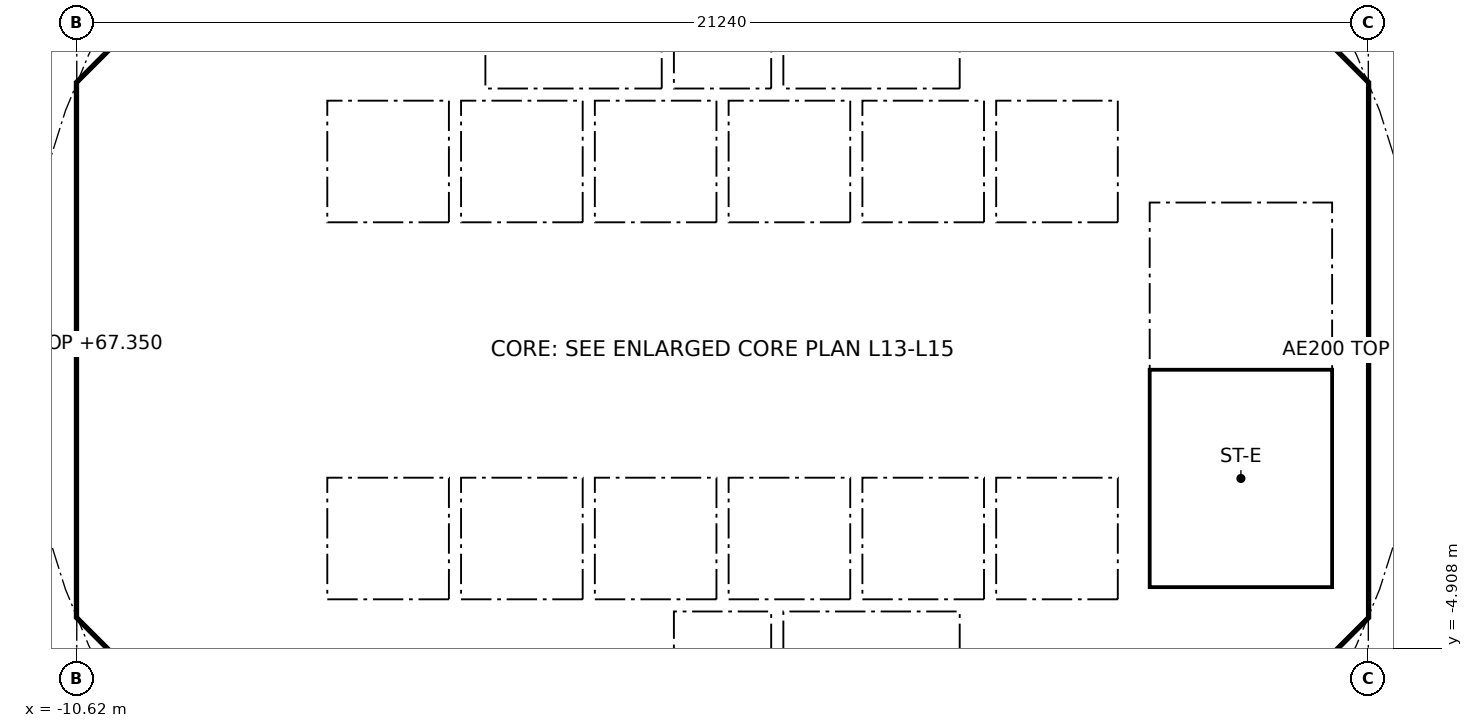
"""IFC4 building model, lengths in metres.
Left out: names, types, materials, properties, quantities, classifications, styles, units other than length and angle.
Written with IfcOpenShell. Run it as: python <this file> out.ifc"""

import sys

from ifc_helpers import new_model, si_unit, direction, frame, frame_2d, origin, place, context, subcontext, project, spatial, polyline, rectangle, outline, extrude, element, fill, save


model = new_model("IFC4")
c1 = context("Model", 3, precision=1e-05, world=origin(), true_north=direction((0.0, 1.0)))
c2 = subcontext(c1, "Body", "Model", "MODEL_VIEW")
j1 = project(units=[si_unit("LENGTHUNIT", "METRE"), si_unit("PLANEANGLEUNIT", "RADIAN")], contexts=[c1])
p1 = place(None, origin())
s1 = spatial("IfcSite", under=j1, at=p1, CompositionType="ELEMENT")
p2 = place(p1, origin())
s2 = spatial("IfcBuilding", under=s1, at=p2, CompositionType="ELEMENT")
p3 = place(p2, frame((0.0, 0.0, 64.0)))
s3 = spatial("IfcBuildingStorey", under=s2, at=p3, CompositionType="ELEMENT", Elevation=64.0)
p4 = place(p3, frame((9.988, 4.613, 0.0), z_axis=(0.0, 0.0, 1.0), x_axis=(-0.707106781187, 0.707106781187, 0.0)))
e1 = element("IfcWall", 1, at=p4, inside=s3, PredefinedType="SHEAR", context=c2, shape_type="SweptSolid", body=[
    extrude(rectangle(XDim=7.602, YDim=0.6, at=frame_2d((3.801, 0.0))), origin(), (0.0, 0.0, 1.0), 3.35),
])
p5 = place(p4, frame((3.201, 0.0, 0.0)))
e2 = element("IfcOpeningElement", 2, at=p5, cuts=e1, PredefinedType="OPENING", context=c2, shape_type="SweptSolid", body=[
    extrude(rectangle(XDim=1.2, YDim=2.1, at=frame_2d((0.6, 1.05))), frame((0.0, 0.31, 0.0), z_axis=(0.0, -1.0, 0.0), x_axis=(1.0, 0.0, 0.0)), (0.0, 0.0, 1.0), 0.62),
])
p6 = place(p3, frame((-4.613, 9.988, 0.0), z_axis=(0.0, 0.0, 1.0), x_axis=(-0.707106781187, -0.707106781187, 0.0)))
e3 = element("IfcWall", 3, at=p6, inside=s3, PredefinedType="SHEAR", context=c2, shape_type="SweptSolid", body=[
    extrude(rectangle(XDim=7.602, YDim=0.6, at=frame_2d((3.801, 0.0))), origin(), (0.0, 0.0, 1.0), 3.35),
])
p7 = place(p6, frame((0.351, 0.0, 0.0)))
e4 = element("IfcOpeningElement", 4, at=p7, cuts=e3, PredefinedType="OPENING", context=c2, shape_type="SweptSolid", body=[
    extrude(rectangle(XDim=1.1, YDim=2.1, at=frame_2d((0.55, 1.05))), frame((0.0, 0.31, 0.0), z_axis=(0.0, -1.0, 0.0), x_axis=(1.0, 0.0, 0.0)), (0.0, 0.0, 1.0), 0.62),
])
p8 = place(p3, frame((-10.325, 3.801, 0.0), z_axis=(0.0, 0.0, 1.0), x_axis=(0.0, -1.0, 0.0)))
e5 = element("IfcWall", 5, at=p8, inside=s3, PredefinedType="SHEAR", context=c2, shape_type="SweptSolid", body=[
    extrude(rectangle(XDim=7.602, YDim=0.6, at=frame_2d((3.801, 0.0))), origin(), (0.0, 0.0, 1.0), 3.35),
])
p9 = place(p8, frame((0.651, 0.0, 0.0)))
e6 = element("IfcOpeningElement", 6, at=p9, cuts=e5, PredefinedType="OPENING", context=c2, shape_type="SweptSolid", body=[
    extrude(rectangle(XDim=1.5, YDim=2.1, at=frame_2d((0.75, 1.05))), frame((0.0, 0.31, 0.0), z_axis=(0.0, -1.0, 0.0), x_axis=(1.0, 0.0, 0.0)), (0.0, 0.0, 1.0), 0.62),
])
p10 = place(p8, frame((5.451, 0.0, 0.0)))
e7 = element("IfcOpeningElement", 7, at=p10, cuts=e5, PredefinedType="OPENING", context=c2, shape_type="SweptSolid", body=[
    extrude(rectangle(XDim=1.5, YDim=2.1, at=frame_2d((0.75, 1.05))), frame((0.0, 0.31, 0.0), z_axis=(0.0, -1.0, 0.0), x_axis=(1.0, 0.0, 0.0)), (0.0, 0.0, 1.0), 0.62),
])
p11 = place(p3, frame((-9.988, -4.613, 0.0), z_axis=(0.0, 0.0, 1.0), x_axis=(0.707106781187, -0.707106781187, 0.0)))
e8 = element("IfcWall", 8, at=p11, inside=s3, PredefinedType="SHEAR", context=c2, shape_type="SweptSolid", body=[
    extrude(rectangle(XDim=7.602, YDim=0.6, at=frame_2d((3.801, 0.0))), origin(), (0.0, 0.0, 1.0), 3.35),
])
p12 = place(p11, frame((6.151, 0.0, 0.0)))
e9 = element("IfcOpeningElement", 9, at=p12, cuts=e8, PredefinedType="OPENING", context=c2, shape_type="SweptSolid", body=[
    extrude(rectangle(XDim=1.1, YDim=2.1, at=frame_2d((0.55, 1.05))), frame((0.0, 0.31, 0.0), z_axis=(0.0, -1.0, 0.0), x_axis=(1.0, 0.0, 0.0)), (0.0, 0.0, 1.0), 0.62),
])
p13 = place(p3, frame((4.613, -9.988, 0.0), z_axis=(0.0, 0.0, 1.0), x_axis=(0.707106781187, 0.707106781187, 0.0)))
e10 = element("IfcWall", 10, at=p13, inside=s3, PredefinedType="SHEAR", context=c2, shape_type="SweptSolid", body=[
    extrude(rectangle(XDim=7.602, YDim=0.6, at=frame_2d((3.801, 0.0))), origin(), (0.0, 0.0, 1.0), 3.35),
])
p14 = place(p13, frame((3.201, 0.0, 0.0)))
e11 = element("IfcOpeningElement", 11, at=p14, cuts=e10, PredefinedType="OPENING", context=c2, shape_type="SweptSolid", body=[
    extrude(rectangle(XDim=1.2, YDim=2.1, at=frame_2d((0.6, 1.05))), frame((0.0, 0.31, 0.0), z_axis=(0.0, -1.0, 0.0), x_axis=(1.0, 0.0, 0.0)), (0.0, 0.0, 1.0), 0.62),
])
p15 = place(p3, frame((-5.8, 4.3, 0.0), z_axis=(0.0, 0.0, 1.0), x_axis=(0.0, 1.0, 0.0)))
e12 = element("IfcWall", 12, at=p15, inside=s3, PredefinedType="PARTITIONING", context=c2, shape_type="SweptSolid", body=[
    extrude(rectangle(XDim=3.927, YDim=0.15, at=frame_2d((1.963, 0.0))), origin(), (0.0, 0.0, 1.0), 3.35),
])
p16 = place(p15, frame((0.413, 0.0, 0.0)))
e13 = element("IfcOpeningElement", 13, at=p16, cuts=e12, PredefinedType="OPENING", context=c2, shape_type="SweptSolid", body=[
    extrude(rectangle(XDim=0.9, YDim=2.1, at=frame_2d((0.45, 1.05))), frame((0.0, 0.085, 0.0), z_axis=(0.0, -1.0, 0.0), x_axis=(1.0, 0.0, 0.0)), (0.0, 0.0, 1.0), 0.17),
])
p17 = place(p15, frame((2.489, 0.0, 0.0)))
e14 = element("IfcOpeningElement", 14, at=p17, cuts=e12, PredefinedType="OPENING", context=c2, shape_type="SweptSolid", body=[
    extrude(rectangle(XDim=0.9, YDim=2.1, at=frame_2d((0.45, 1.05))), frame((0.0, 0.085, 0.0), z_axis=(0.0, -1.0, 0.0), x_axis=(1.0, 0.0, 0.0)), (0.0, 0.0, 1.0), 0.17),
])
p18 = place(p3, frame((4.0, 4.3, 0.0), z_axis=(0.0, 0.0, 1.0), x_axis=(0.0, 1.0, 0.0)))
e15 = element("IfcWall", 15, at=p18, inside=s3, PredefinedType="SOLIDWALL", context=c2, shape_type="SweptSolid", body=[
    extrude(rectangle(XDim=2.2, YDim=0.2, at=frame_2d((1.1, 0.0))), origin(), (0.0, 0.0, 1.0), 3.35),
])
p19 = place(p18, frame((0.55, 0.0, 0.0)))
e16 = element("IfcOpeningElement", 16, at=p19, cuts=e15, PredefinedType="OPENING", context=c2, shape_type="SweptSolid", body=[
    extrude(rectangle(XDim=1.1, YDim=2.1, at=frame_2d((0.55, 1.05))), frame((0.0, 0.11, 0.0), z_axis=(0.0, -1.0, 0.0), x_axis=(1.0, 0.0, 0.0)), (0.0, 0.0, 1.0), 0.22),
])
p20 = place(p3, frame((-4.0, 4.3, 0.0), z_axis=(0.0, 0.0, 1.0), x_axis=(0.0, 1.0, 0.0)))
e17 = element("IfcWall", 17, at=p20, inside=s3, PredefinedType="SOLIDWALL", context=c2, shape_type="SweptSolid", body=[
    extrude(rectangle(XDim=2.2, YDim=0.2, at=frame_2d((1.1, 0.0))), origin(), (0.0, 0.0, 1.0), 3.35),
])
p21 = place(p20, frame((0.55, 0.0, 0.0)))
e18 = element("IfcOpeningElement", 18, at=p21, cuts=e17, PredefinedType="OPENING", context=c2, shape_type="SweptSolid", body=[
    extrude(rectangle(XDim=1.1, YDim=2.1, at=frame_2d((0.55, 1.05))), frame((0.0, 0.11, 0.0), z_axis=(0.0, -1.0, 0.0), x_axis=(1.0, 0.0, 0.0)), (0.0, 0.0, 1.0), 0.22),
])
p22 = place(p3, frame((-6.7, 2.0, 0.0), z_axis=(0.0, 0.0, 1.0), x_axis=(1.0, 0.0, 0.0)))
e19 = element("IfcWall", 19, at=p22, inside=s3, PredefinedType="SOLIDWALL", context=c2, shape_type="SweptSolid", body=[
    extrude(rectangle(XDim=13.4, YDim=0.2, at=frame_2d((6.7, 0.0))), origin(), (0.0, 0.0, 1.0), 3.35),
])
p23 = place(p22, frame((0.65, 0.0, 0.0)))
e20 = element("IfcOpeningElement", 20, at=p23, cuts=e19, PredefinedType="OPENING", context=c2, shape_type="SweptSolid", body=[
    extrude(rectangle(XDim=1.1, YDim=2.1, at=frame_2d((0.55, 1.05))), frame((0.0, 0.11, 0.0), z_axis=(0.0, -1.0, 0.0), x_axis=(1.0, 0.0, 0.0)), (0.0, 0.0, 1.0), 0.22),
])
p24 = place(p22, frame((2.85, 0.0, 0.0)))
e21 = element("IfcOpeningElement", 21, at=p24, cuts=e19, PredefinedType="OPENING", context=c2, shape_type="SweptSolid", body=[
    extrude(rectangle(XDim=1.1, YDim=2.1, at=frame_2d((0.55, 1.05))), frame((0.0, 0.11, 0.0), z_axis=(0.0, -1.0, 0.0), x_axis=(1.0, 0.0, 0.0)), (0.0, 0.0, 1.0), 0.22),
])
p25 = place(p22, frame((5.05, 0.0, 0.0)))
e22 = element("IfcOpeningElement", 22, at=p25, cuts=e19, PredefinedType="OPENING", context=c2, shape_type="SweptSolid", body=[
    extrude(rectangle(XDim=1.1, YDim=2.1, at=frame_2d((0.55, 1.05))), frame((0.0, 0.11, 0.0), z_axis=(0.0, -1.0, 0.0), x_axis=(1.0, 0.0, 0.0)), (0.0, 0.0, 1.0), 0.22),
])
p26 = place(p3, frame((6.7, 4.0, 0.0), z_axis=(0.0, 0.0, 1.0), x_axis=(1.0, 0.0, 0.0)))
e23 = element("IfcWall", 23, at=p26, inside=s3, PredefinedType="SOLIDWALL", context=c2, shape_type="SweptSolid", body=[
    extrude(rectangle(XDim=3.325, YDim=0.2, at=frame_2d((1.662, 0.0))), origin(), (0.0, 0.0, 1.0), 3.35),
])
p27 = place(p26, frame((1.25, 0.0, 0.0)))
e24 = element("IfcOpeningElement", 24, at=p27, cuts=e23, PredefinedType="OPENING", context=c2, shape_type="SweptSolid", body=[
    extrude(rectangle(XDim=1.1, YDim=2.1, at=frame_2d((0.55, 1.05))), frame((0.0, 0.11, 0.0), z_axis=(0.0, -1.0, 0.0), x_axis=(1.0, 0.0, 0.0)), (0.0, 0.0, 1.0), 0.22),
])
p28 = place(p3, frame((-7.4, -6.627, 0.0), z_axis=(0.0, 0.0, 1.0), x_axis=(0.0, 1.0, 0.0)))
e25 = element("IfcWall", 25, at=p28, inside=s3, PredefinedType="PARTITIONING", context=c2, shape_type="SweptSolid", body=[
    extrude(rectangle(XDim=2.527, YDim=0.15, at=frame_2d((1.263, 0.0))), origin(), (0.0, 0.0, 1.0), 3.35),
])
p29 = place(p28, frame((0.776, 0.0, 0.0)))
e26 = element("IfcOpeningElement", 26, at=p29, cuts=e25, PredefinedType="OPENING", context=c2, shape_type="SweptSolid", body=[
    extrude(rectangle(XDim=0.9, YDim=2.1, at=frame_2d((0.45, 1.05))), frame((0.0, 0.085, 0.0), z_axis=(0.0, -1.0, 0.0), x_axis=(1.0, 0.0, 0.0)), (0.0, 0.0, 1.0), 0.17),
])
p30 = place(p3, frame((4.0, -6.5, 0.0), z_axis=(0.0, 0.0, 1.0), x_axis=(0.0, 1.0, 0.0)))
e27 = element("IfcWall", 27, at=p30, inside=s3, PredefinedType="SOLIDWALL", context=c2, shape_type="SweptSolid", body=[
    extrude(rectangle(XDim=2.2, YDim=0.2, at=frame_2d((1.1, 0.0))), origin(), (0.0, 0.0, 1.0), 3.35),
])
p31 = place(p30, frame((0.55, 0.0, 0.0)))
e28 = element("IfcOpeningElement", 28, at=p31, cuts=e27, PredefinedType="OPENING", context=c2, shape_type="SweptSolid", body=[
    extrude(rectangle(XDim=1.1, YDim=2.1, at=frame_2d((0.55, 1.05))), frame((0.0, 0.11, 0.0), z_axis=(0.0, -1.0, 0.0), x_axis=(1.0, 0.0, 0.0)), (0.0, 0.0, 1.0), 0.22),
])
p32 = place(p3, frame((-4.0, -6.5, 0.0), z_axis=(0.0, 0.0, 1.0), x_axis=(0.0, 1.0, 0.0)))
e29 = element("IfcWall", 29, at=p32, inside=s3, PredefinedType="SOLIDWALL", context=c2, shape_type="SweptSolid", body=[
    extrude(rectangle(XDim=2.2, YDim=0.2, at=frame_2d((1.1, 0.0))), origin(), (0.0, 0.0, 1.0), 3.35),
])
p33 = place(p32, frame((0.65, 0.0, 0.0)))
e30 = element("IfcOpeningElement", 30, at=p33, cuts=e29, PredefinedType="OPENING", context=c2, shape_type="SweptSolid", body=[
    extrude(rectangle(XDim=0.9, YDim=2.1, at=frame_2d((0.45, 1.05))), frame((0.0, 0.11, 0.0), z_axis=(0.0, -1.0, 0.0), x_axis=(1.0, 0.0, 0.0)), (0.0, 0.0, 1.0), 0.22),
])
p34 = place(p3, frame((-6.7, -2.0, 0.0), z_axis=(0.0, 0.0, 1.0), x_axis=(1.0, 0.0, 0.0)))
e31 = element("IfcWall", 31, at=p34, inside=s3, PredefinedType="SOLIDWALL", context=c2, shape_type="SweptSolid", body=[
    extrude(rectangle(XDim=13.4, YDim=0.2, at=frame_2d((6.7, 0.0))), origin(), (0.0, 0.0, 1.0), 3.35),
])
p35 = place(p34, frame((0.65, 0.0, 0.0)))
e32 = element("IfcOpeningElement", 32, at=p35, cuts=e31, PredefinedType="OPENING", context=c2, shape_type="SweptSolid", body=[
    extrude(rectangle(XDim=1.1, YDim=2.1, at=frame_2d((0.55, 1.05))), frame((0.0, 0.11, 0.0), z_axis=(0.0, -1.0, 0.0), x_axis=(1.0, 0.0, 0.0)), (0.0, 0.0, 1.0), 0.22),
])
p36 = place(p34, frame((2.85, 0.0, 0.0)))
e33 = element("IfcOpeningElement", 33, at=p36, cuts=e31, PredefinedType="OPENING", context=c2, shape_type="SweptSolid", body=[
    extrude(rectangle(XDim=1.1, YDim=2.1, at=frame_2d((0.55, 1.05))), frame((0.0, 0.11, 0.0), z_axis=(0.0, -1.0, 0.0), x_axis=(1.0, 0.0, 0.0)), (0.0, 0.0, 1.0), 0.22),
])
p37 = place(p3, origin())
e34 = element("IfcWall", 34, at=p37, inside=s3, PredefinedType="SHEAR", context=c2, shape_type="SweptSolid", body=[
    extrude(outline(polyline([(-10.625, -3.801), (-10.025, -3.801), (-10.025, -4.152), (-9.776, -4.401), (-10.2, -4.825), (-10.625, -4.401), (-10.625, -3.801)])), origin(), (0.0, 0.0, 1.0), 3.35),
])
p38 = place(p3, origin())
e35 = element("IfcWall", 35, at=p38, inside=s3, PredefinedType="SHEAR", context=c2, shape_type="SweptSolid", body=[
    extrude(outline(polyline([(-10.2, 4.825), (-9.776, 4.401), (-10.025, 4.152), (-10.025, 3.801), (-10.625, 3.801), (-10.625, 4.401), (-10.2, 4.825)])), origin(), (0.0, 0.0, 1.0), 3.35),
])
p39 = place(p3, origin())
e36 = element("IfcWall", 36, at=p39, inside=s3, PredefinedType="SHEAR", context=c2, shape_type="SweptSolid", body=[
    extrude(outline(polyline([(9.776, -4.401), (10.025, -4.152), (10.025, -3.801), (10.025, 4.152), (9.776, 4.401), (10.2, 4.825), (10.625, 4.401), (10.625, -4.401), (10.2, -4.825), (9.776, -4.401)])), origin(), (0.0, 0.0, 1.0), 3.35),
])
for number, where, z_axis, x_axis in (
    (37, (-10.025, -4.0, 0.0), (0.0, 0.0, 1.0), (1.0, 0.0, 0.0)),
    (38, (-10.025, 4.0, 0.0), (0.0, 0.0, 1.0), (1.0, 0.0, 0.0)),
):
    element("IfcWall", number, at=place(p3, frame(where, z_axis=z_axis, x_axis=x_axis)), inside=s3, PredefinedType="PARTITIONING", context=c2, shape_type="SweptSolid", body=[
        extrude(rectangle(XDim=3.325, YDim=0.2, at=frame_2d((1.662, 0.0))), origin(), (0.0, 0.0, 1.0), 3.35),
    ])
for number, where, z_axis, x_axis in (
    (39, (-0.9, -6.5, 0.0), (0.0, 0.0, 1.0), (0.0, 1.0, 0.0)),
    (40, (0.9, -6.5, 0.0), (0.0, 0.0, 1.0), (0.0, 1.0, 0.0)),
):
    element("IfcWall", number, at=place(p3, frame(where, z_axis=z_axis, x_axis=x_axis)), inside=s3, PredefinedType="SOLIDWALL", context=c2, shape_type="SweptSolid", body=[
        extrude(rectangle(XDim=2.2, YDim=0.2, at=frame_2d((1.1, 0.0))), origin(), (0.0, 0.0, 1.0), 3.35),
    ])
p40 = place(p3, origin())
e41 = element("IfcWall", 41, at=p40, inside=s3, PredefinedType="SOLIDWALL", context=c2, shape_type="SweptSolid", body=[
    extrude(outline(polyline([(-6.7, -2.1), (-6.5, -2.1), (-6.5, -4.1), (-4.5, -4.1), (-4.5, -2.1), (-4.3, -2.1), (-4.3, -4.1), (-2.3, -4.1), (-2.3, -2.1), (-2.1, -2.1), (-2.1, -4.1), (-0.1, -4.1), (-0.1, -2.1), (0.1, -2.1), (0.1, -4.1), (2.1, -4.1), (2.1, -2.1), (2.3, -2.1), (2.3, -4.1), (4.3, -4.1), (4.3, -2.1), (4.5, -2.1), (4.5, -4.1), (6.5, -4.1), (6.5, -2.1), (6.7, -2.1), (6.7, -4.3), (-6.7, -4.3), (-6.7, -2.1)])), origin(), (0.0, 0.0, 1.0), 3.35),
])
for number, where, z_axis, x_axis in (
    (42, (-0.9, 4.3, 0.0), (0.0, 0.0, 1.0), (0.0, 1.0, 0.0)),
    (43, (0.9, 4.3, 0.0), (0.0, 0.0, 1.0), (0.0, 1.0, 0.0)),
):
    element("IfcWall", number, at=place(p3, frame(where, z_axis=z_axis, x_axis=x_axis)), inside=s3, PredefinedType="SOLIDWALL", context=c2, shape_type="SweptSolid", body=[
        extrude(rectangle(XDim=2.2, YDim=0.2, at=frame_2d((1.1, 0.0))), origin(), (0.0, 0.0, 1.0), 3.35),
    ])
p41 = place(p3, origin())
e44 = element("IfcWall", 44, at=p41, inside=s3, PredefinedType="SOLIDWALL", context=c2, shape_type="SweptSolid", body=[
    extrude(outline(polyline([(-6.5, 2.1), (-6.7, 2.1), (-6.7, 4.3), (6.7, 4.3), (6.7, 2.1), (6.5, 2.1), (6.5, 4.1), (4.5, 4.1), (4.5, 2.1), (4.3, 2.1), (4.3, 4.1), (2.3, 4.1), (2.3, 2.1), (2.1, 2.1), (2.1, 4.1), (0.1, 4.1), (0.1, 2.1), (-0.1, 2.1), (-0.1, 4.1), (-2.1, 4.1), (-2.1, 2.1), (-2.3, 2.1), (-2.3, 4.1), (-4.3, 4.1), (-4.3, 2.1), (-4.5, 2.1), (-4.5, 4.1), (-6.5, 4.1), (-6.5, 2.1)])), origin(), (0.0, 0.0, 1.0), 3.35),
])
p42 = place(p3, origin())
e45 = element("IfcWall", 45, at=p42, inside=s3, PredefinedType="SOLIDWALL", context=c2, shape_type="SweptSolid", body=[
    extrude(outline(polyline([(7.025, -3.9), (6.7, -3.9), (6.7, 3.9), (7.025, 3.9), (7.025, -3.9)])), origin(), (0.0, 0.0, 1.0), 3.35),
])
p43 = place(p3, origin())
e46 = element("IfcWall", 46, at=p43, inside=s3, PredefinedType="SOLIDWALL", context=c2, shape_type="SweptSolid", body=[
    extrude(outline(polyline([(10.025, -4.1), (6.7, -4.1), (6.7, -3.9), (10.025, -3.9), (10.025, -4.1)])), origin(), (0.0, 0.0, 1.0), 3.35),
])
p44 = place(p23, origin())
e47 = element("IfcDoor", 47, at=p44, inside=s3, OperationType="DOUBLE_DOOR_SLIDING", PredefinedType="DOOR", context=c2, shape_type="SweptSolid", body=[
    extrude(rectangle(XDim=1.1, YDim=2.1, at=frame_2d((0.55, 1.05))), frame((0.0, 0.025, 0.0), z_axis=(0.0, -1.0, 0.0), x_axis=(1.0, 0.0, 0.0)), (0.0, 0.0, 1.0), 0.05),
])
fill(e20, e47)
p45 = place(p24, origin())
e48 = element("IfcDoor", 48, at=p45, inside=s3, OperationType="DOUBLE_DOOR_SLIDING", PredefinedType="DOOR", context=c2, shape_type="SweptSolid", body=[
    extrude(rectangle(XDim=1.1, YDim=2.1, at=frame_2d((0.55, 1.05))), frame((0.0, 0.025, 0.0), z_axis=(0.0, -1.0, 0.0), x_axis=(1.0, 0.0, 0.0)), (0.0, 0.0, 1.0), 0.05),
])
fill(e21, e48)
p46 = place(p25, origin())
e49 = element("IfcDoor", 49, at=p46, inside=s3, OperationType="DOUBLE_DOOR_SLIDING", PredefinedType="DOOR", context=c2, shape_type="SweptSolid", body=[
    extrude(rectangle(XDim=1.1, YDim=2.1, at=frame_2d((0.55, 1.05))), frame((0.0, 0.025, 0.0), z_axis=(0.0, -1.0, 0.0), x_axis=(1.0, 0.0, 0.0)), (0.0, 0.0, 1.0), 0.05),
])
fill(e22, e49)
p47 = place(p35, origin())
e50 = element("IfcDoor", 50, at=p47, inside=s3, OperationType="DOUBLE_DOOR_SLIDING", PredefinedType="DOOR", context=c2, shape_type="SweptSolid", body=[
    extrude(rectangle(XDim=1.1, YDim=2.1, at=frame_2d((0.55, 1.05))), frame((0.0, 0.025, 0.0), z_axis=(0.0, -1.0, 0.0), x_axis=(1.0, 0.0, 0.0)), (0.0, 0.0, 1.0), 0.05),
])
fill(e32, e50)
p48 = place(p36, origin())
e51 = element("IfcDoor", 51, at=p48, inside=s3, OperationType="DOUBLE_DOOR_SLIDING", PredefinedType="DOOR", context=c2, shape_type="SweptSolid", body=[
    extrude(rectangle(XDim=1.1, YDim=2.1, at=frame_2d((0.55, 1.05))), frame((0.0, 0.025, 0.0), z_axis=(0.0, -1.0, 0.0), x_axis=(1.0, 0.0, 0.0)), (0.0, 0.0, 1.0), 0.05),
])
fill(e33, e51)
p49 = place(p19, origin())
e52 = element("IfcDoor", 52, at=p49, inside=s3, OperationType="DOUBLE_DOOR_SLIDING", PredefinedType="DOOR", context=c2, shape_type="SweptSolid", body=[
    extrude(rectangle(XDim=1.1, YDim=2.1, at=frame_2d((0.55, 1.05))), frame((0.0, 0.025, 0.0), z_axis=(0.0, -1.0, 0.0), x_axis=(1.0, 0.0, 0.0)), (0.0, 0.0, 1.0), 0.05),
])
fill(e16, e52)
p50 = place(p31, origin())
e53 = element("IfcDoor", 53, at=p50, inside=s3, OperationType="DOUBLE_DOOR_SLIDING", PredefinedType="DOOR", context=c2, shape_type="SweptSolid", body=[
    extrude(rectangle(XDim=1.1, YDim=2.1, at=frame_2d((0.55, 1.05))), frame((0.0, 0.025, 0.0), z_axis=(0.0, -1.0, 0.0), x_axis=(1.0, 0.0, 0.0)), (0.0, 0.0, 1.0), 0.05),
])
fill(e28, e53)
p51 = place(p21, origin())
e54 = element("IfcDoor", 54, at=p51, inside=s3, OperationType="DOUBLE_DOOR_SLIDING", PredefinedType="DOOR", context=c2, shape_type="SweptSolid", body=[
    extrude(rectangle(XDim=1.1, YDim=2.1, at=frame_2d((0.55, 1.05))), frame((0.0, 0.025, 0.0), z_axis=(0.0, -1.0, 0.0), x_axis=(1.0, 0.0, 0.0)), (0.0, 0.0, 1.0), 0.05),
])
fill(e18, e54)
p52 = place(p27, frame((1.1, 0.0, 0.0), x_axis=(-1.0, 0.0, 0.0)))
e55 = element("IfcDoor", 55, at=p52, inside=s3, OperationType="SINGLE_SWING_LEFT", PredefinedType="DOOR", context=c2, shape_type="SweptSolid", body=[
    extrude(rectangle(XDim=1.1, YDim=2.1, at=frame_2d((0.55, 1.05))), frame((0.0, 0.025, 0.0), z_axis=(0.0, -1.0, 0.0), x_axis=(1.0, 0.0, 0.0)), (0.0, 0.0, 1.0), 0.05),
])
fill(e24, e55)
p53 = place(p16, origin())
e56 = element("IfcDoor", 56, at=p53, inside=s3, OperationType="SINGLE_SWING_LEFT", PredefinedType="DOOR", context=c2, shape_type="SweptSolid", body=[
    extrude(rectangle(XDim=0.9, YDim=2.1, at=frame_2d((0.45, 1.05))), frame((0.0, 0.025, 0.0), z_axis=(0.0, -1.0, 0.0), x_axis=(1.0, 0.0, 0.0)), (0.0, 0.0, 1.0), 0.05),
])
fill(e13, e56)
p54 = place(p9, origin())
e57 = element("IfcDoor", 57, at=p54, inside=s3, OperationType="DOUBLE_DOOR_SINGLE_SWING", PredefinedType="DOOR", context=c2, shape_type="SweptSolid", body=[
    extrude(rectangle(XDim=1.5, YDim=2.1, at=frame_2d((0.75, 1.05))), frame((0.0, 0.025, 0.0), z_axis=(0.0, -1.0, 0.0), x_axis=(1.0, 0.0, 0.0)), (0.0, 0.0, 1.0), 0.05),
])
fill(e6, e57)
p55 = place(p10, origin())
e58 = element("IfcDoor", 58, at=p55, inside=s3, OperationType="DOUBLE_DOOR_SINGLE_SWING", PredefinedType="DOOR", context=c2, shape_type="SweptSolid", body=[
    extrude(rectangle(XDim=1.5, YDim=2.1, at=frame_2d((0.75, 1.05))), frame((0.0, 0.025, 0.0), z_axis=(0.0, -1.0, 0.0), x_axis=(1.0, 0.0, 0.0)), (0.0, 0.0, 1.0), 0.05),
])
fill(e7, e58)
save(model, sys.argv[1])
